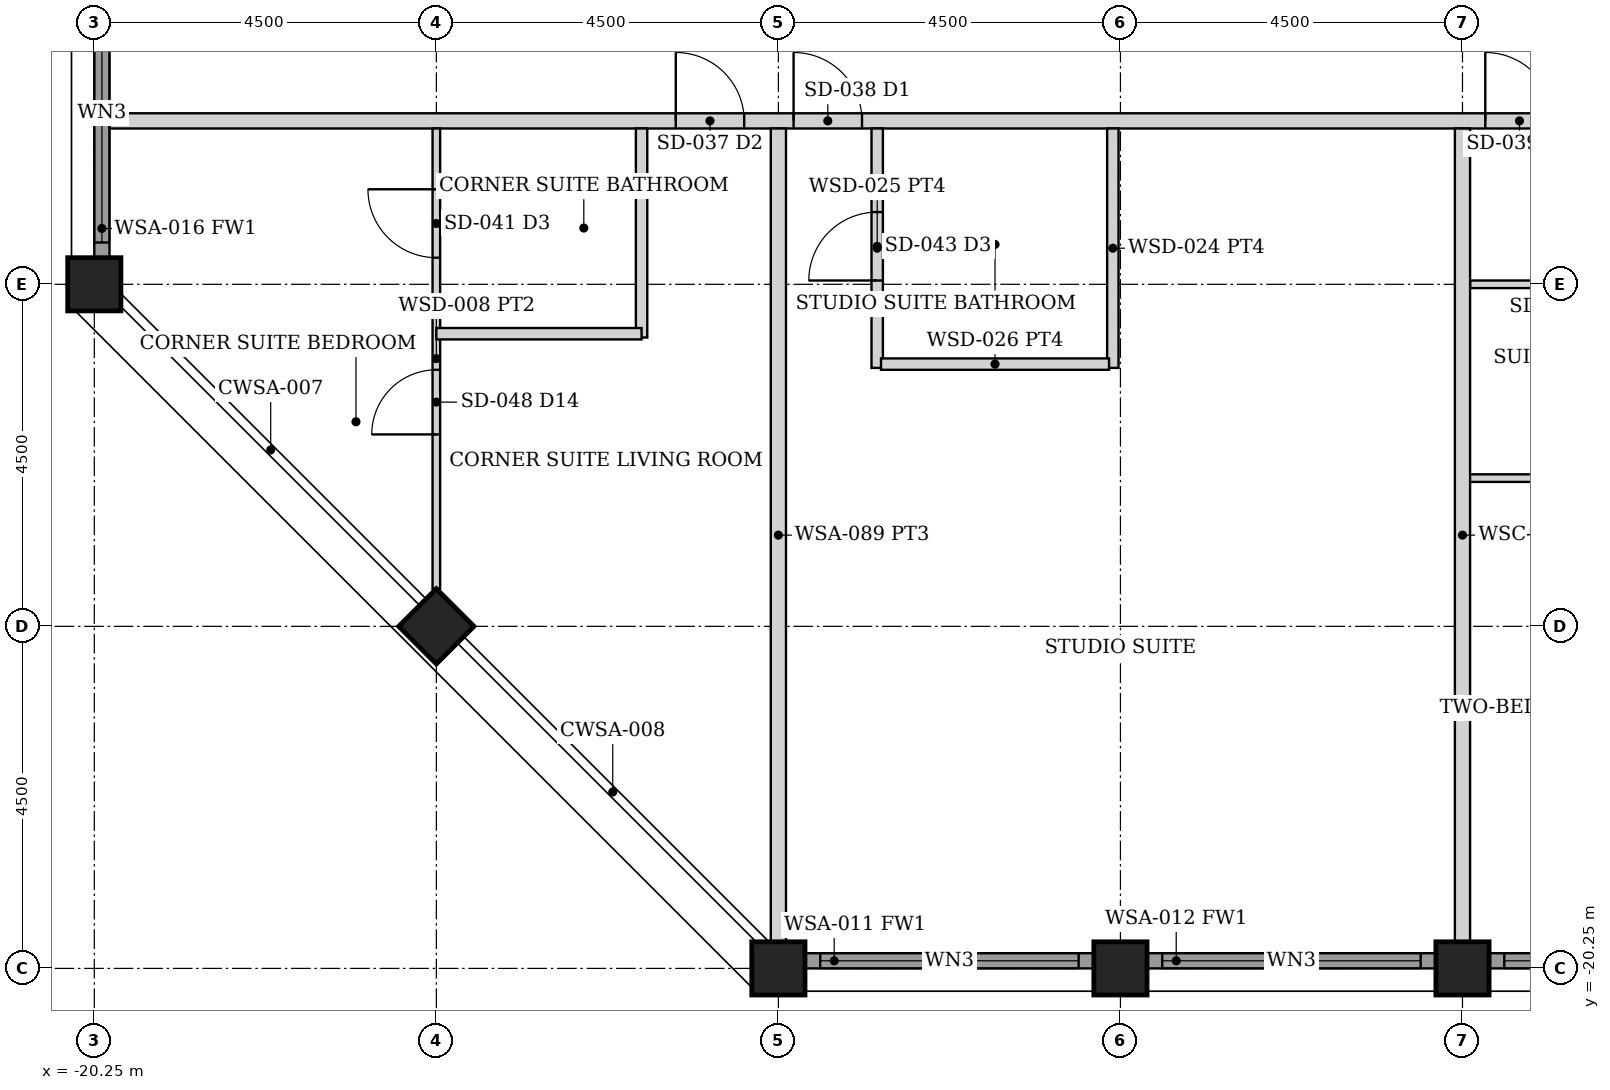
"""IFC4 building model, lengths in metres.
Left out: names, types, materials, properties, quantities, classifications, styles, units other than length and angle.
Written with IfcOpenShell. Run it as: python <this file> out.ifc"""

import sys

from ifc_helpers import new_model, si_unit, direction, frame, frame_2d, origin, origin_2d, place, context, subcontext, project, spatial, rectangle, hollow_rectangle, extrude, element, fill, save


model = new_model("IFC4")
c1 = context("Model", 3, precision=1e-05, world=origin(), true_north=direction((0.0, 1.0)))
c2 = subcontext(c1, "Body", "Model", "MODEL_VIEW")
j1 = project(units=[si_unit("LENGTHUNIT", "METRE"), si_unit("PLANEANGLEUNIT", "RADIAN")], contexts=[c1])
p1 = place(None, origin())
s1 = spatial("IfcSite", under=j1, at=p1, CompositionType="ELEMENT")
p2 = place(p1, origin())
s2 = spatial("IfcBuilding", under=s1, at=p2, CompositionType="ELEMENT")
p3 = place(p2, frame((0.0, 0.0, 234.55)))
s3 = spatial("IfcBuildingStorey", under=s2, at=p3, CompositionType="ELEMENT", Elevation=234.55)
for number, where, z_axis, x_axis in (
    (1, (-11.25, -20.25, 0.0), (0.0, 0.0, 1.0), (0.0, 1.0, 0.0)),
    (2, (-20.25, -11.25, 0.0), (0.0, 0.0, 1.0), (1.0, 0.0, 0.0)),
    (3, (-6.75, -20.25, 0.0), (0.0, 0.0, 1.0), (0.0, 1.0, 0.0)),
    (4, (-2.25, -20.25, 0.0), (0.0, 0.0, 1.0), (0.0, 1.0, 0.0)),
    (5, (-15.75, -15.75, 0.0), (0.0, 0.0, 1.0), (0.707, 0.707, 0.0)),
):
    element("IfcColumn", number, at=place(p3, frame(where, z_axis=z_axis, x_axis=x_axis)), inside=s3, PredefinedType="COLUMN", context=c2, shape_type="SweptSolid", body=[
        extrude(hollow_rectangle(XDim=0.7, YDim=0.7, WallThickness=0.04, at=origin_2d()), origin(), (0.0, 0.0, 1.0), 3.75),
    ])
p4 = place(p3, frame((-10.895, -20.15, 0.0), z_axis=(0.0, 0.0, 1.0), x_axis=(1.0, 0.0, 0.0)))
e6 = element("IfcWall", 6, at=p4, inside=s3, PredefinedType="SOLIDWALL", context=c2, shape_type="SweptSolid", body=[
    extrude(rectangle(XDim=3.79, YDim=0.2, at=frame_2d((1.895, 0.0))), origin(), (0.0, 0.0, 1.0), 2.629),
])
p5 = place(p4, frame((0.195, 0.0, 0.3)))
e7 = element("IfcOpeningElement", 7, at=p5, cuts=e6, PredefinedType="OPENING", context=c2, shape_type="SweptSolid", body=[
    extrude(rectangle(XDim=3.4, YDim=2.179, at=frame_2d((1.7, 1.089))), frame((0.0, 0.11, 0.0), z_axis=(0.0, -1.0, 0.0), x_axis=(1.0, 0.0, 0.0)), (0.0, 0.0, 1.0), 0.22),
])
p6 = place(p3, frame((-6.395, -20.15, 0.0), z_axis=(0.0, 0.0, 1.0), x_axis=(1.0, 0.0, 0.0)))
e8 = element("IfcWall", 8, at=p6, inside=s3, PredefinedType="SOLIDWALL", context=c2, shape_type="SweptSolid", body=[
    extrude(rectangle(XDim=3.79, YDim=0.2, at=frame_2d((1.895, 0.0))), origin(), (0.0, 0.0, 1.0), 2.629),
])
p7 = place(p6, frame((0.195, 0.0, 0.3)))
e9 = element("IfcOpeningElement", 9, at=p7, cuts=e8, PredefinedType="OPENING", context=c2, shape_type="SweptSolid", body=[
    extrude(rectangle(XDim=3.4, YDim=2.179, at=frame_2d((1.7, 1.089))), frame((0.0, 0.11, 0.0), z_axis=(0.0, -1.0, 0.0), x_axis=(1.0, 0.0, 0.0)), (0.0, 0.0, 1.0), 0.22),
])
p8 = place(p3, frame((-1.895, -20.15, 0.0), z_axis=(0.0, 0.0, 1.0), x_axis=(1.0, 0.0, 0.0)))
e10 = element("IfcWall", 10, at=p8, inside=s3, PredefinedType="SOLIDWALL", context=c2, shape_type="SweptSolid", body=[
    extrude(rectangle(XDim=3.79, YDim=0.2, at=frame_2d((1.895, 0.0))), origin(), (0.0, 0.0, 1.0), 2.629),
])
p9 = place(p8, frame((0.195, 0.0, 0.3)))
e11 = element("IfcOpeningElement", 11, at=p9, cuts=e10, PredefinedType="OPENING", context=c2, shape_type="SweptSolid", body=[
    extrude(rectangle(XDim=3.4, YDim=2.179, at=frame_2d((1.7, 1.089))), frame((0.0, 0.11, 0.0), z_axis=(0.0, -1.0, 0.0), x_axis=(1.0, 0.0, 0.0)), (0.0, 0.0, 1.0), 0.22),
])
p10 = place(p3, frame((-20.15, -10.895, 0.0), z_axis=(0.0, 0.0, 1.0), x_axis=(0.0, 1.0, 0.0)))
e12 = element("IfcWall", 12, at=p10, inside=s3, PredefinedType="SOLIDWALL", context=c2, shape_type="SweptSolid", body=[
    extrude(rectangle(XDim=3.79, YDim=0.2, at=frame_2d((1.895, 0.0))), origin(), (0.0, 0.0, 1.0), 2.629),
])
p11 = place(p10, frame((0.195, 0.0, 0.3)))
e13 = element("IfcOpeningElement", 13, at=p11, cuts=e12, PredefinedType="OPENING", context=c2, shape_type="SweptSolid", body=[
    extrude(rectangle(XDim=3.4, YDim=2.179, at=frame_2d((1.7, 1.089))), frame((0.0, 0.11, 0.0), z_axis=(0.0, -1.0, 0.0), x_axis=(1.0, 0.0, 0.0)), (0.0, 0.0, 1.0), 0.22),
])
p12 = place(p3, frame((-20.05, -9.1, 0.0), z_axis=(0.0, 0.0, 1.0), x_axis=(1.0, 0.0, 0.0)))
e14 = element("IfcWall", 14, at=p12, inside=s3, PredefinedType="PARTITIONING", context=c2, shape_type="SweptSolid", body=[
    extrude(rectangle(XDim=40.1, YDim=0.2, at=frame_2d((20.05, 0.0))), origin(), (0.0, 0.0, 1.0), 2.629),
])
p13 = place(p12, frame((9.0, 0.0, 0.0)))
e15 = element("IfcOpeningElement", 15, at=p13, cuts=e14, PredefinedType="OPENING", context=c2, shape_type="SweptSolid", body=[
    extrude(rectangle(XDim=0.9, YDim=2.1, at=frame_2d((0.45, 1.05))), frame((0.0, 0.11, 0.0), z_axis=(0.0, -1.0, 0.0), x_axis=(1.0, 0.0, 0.0)), (0.0, 0.0, 1.0), 0.22),
])
p14 = place(p12, frame((18.1, 0.0, 0.0)))
e16 = element("IfcOpeningElement", 16, at=p14, cuts=e14, PredefinedType="OPENING", context=c2, shape_type="SweptSolid", body=[
    extrude(rectangle(XDim=0.9, YDim=2.1, at=frame_2d((0.45, 1.05))), frame((0.0, 0.11, 0.0), z_axis=(0.0, -1.0, 0.0), x_axis=(1.0, 0.0, 0.0)), (0.0, 0.0, 1.0), 0.22),
])
p15 = place(p12, frame((31.75, 0.0, 0.0)))
e17 = element("IfcOpeningElement", 17, at=p15, cuts=e14, PredefinedType="OPENING", context=c2, shape_type="SweptSolid", body=[
    extrude(rectangle(XDim=0.9, YDim=2.1, at=frame_2d((0.45, 1.05))), frame((0.0, 0.11, 0.0), z_axis=(0.0, -1.0, 0.0), x_axis=(1.0, 0.0, 0.0)), (0.0, 0.0, 1.0), 0.22),
])
p16 = place(p12, frame((7.45, 0.0, 0.0)))
e18 = element("IfcOpeningElement", 18, at=p16, cuts=e14, PredefinedType="OPENING", context=c2, shape_type="SweptSolid", body=[
    extrude(rectangle(XDim=0.9, YDim=2.1, at=frame_2d((0.45, 1.05))), frame((0.0, 0.11, 0.0), z_axis=(0.0, -1.0, 0.0), x_axis=(1.0, 0.0, 0.0)), (0.0, 0.0, 1.0), 0.22),
])
p17 = place(p3, frame((-9.95, -12.35, 0.0), z_axis=(0.0, 0.0, 1.0), x_axis=(0.0, 1.0, 0.0)))
e19 = element("IfcWall", 19, at=p17, inside=s3, PredefinedType="PARTITIONING", context=c2, shape_type="SweptSolid", body=[
    extrude(rectangle(XDim=3.15, YDim=0.15, at=frame_2d((1.575, 0.0))), origin(), (0.0, 0.0, 1.0), 2.629),
])
p18 = place(p17, frame((1.15, 0.0, 0.0)))
e20 = element("IfcOpeningElement", 20, at=p18, cuts=e19, PredefinedType="OPENING", context=c2, shape_type="SweptSolid", body=[
    extrude(rectangle(XDim=0.9, YDim=2.1, at=frame_2d((0.45, 1.05))), frame((0.0, 0.085, 0.0), z_axis=(0.0, -1.0, 0.0), x_axis=(1.0, 0.0, 0.0)), (0.0, 0.0, 1.0), 0.17),
])
p19 = place(p3, frame((-6.85, -12.35, 0.0), z_axis=(0.0, 0.0, 1.0), x_axis=(0.0, 1.0, 0.0)))
e21 = element("IfcWall", 21, at=p19, inside=s3, PredefinedType="PARTITIONING", context=c2, shape_type="SweptSolid", body=[
    extrude(rectangle(XDim=3.15, YDim=0.15, at=frame_2d((1.575, 0.0))), origin(), (0.0, 0.0, 1.0), 2.629),
])
p20 = place(p3, frame((-9.9, -12.3, 0.0), z_axis=(0.0, 0.0, 1.0), x_axis=(1.0, 0.0, 0.0)))
e22 = element("IfcWall", 22, at=p20, inside=s3, PredefinedType="PARTITIONING", context=c2, shape_type="SweptSolid", body=[
    extrude(rectangle(XDim=3.0, YDim=0.15, at=frame_2d((1.5, 0.0))), origin(), (0.0, 0.0, 1.0), 2.629),
])
p21 = place(p3, frame((-2.15, -11.25, 0.0), z_axis=(0.0, 0.0, 1.0), x_axis=(1.0, 0.0, 0.0)))
e23 = element("IfcWall", 23, at=p21, inside=s3, PredefinedType="PARTITIONING", context=c2, shape_type="SweptSolid", body=[
    extrude(rectangle(XDim=13.3, YDim=0.1, at=frame_2d((6.65, 0.0))), origin(), (0.0, 0.0, 1.0), 2.629),
])
p22 = place(p21, frame((0.85, 0.0, 0.0)))
e24 = element("IfcOpeningElement", 24, at=p22, cuts=e23, PredefinedType="OPENING", context=c2, shape_type="SweptSolid", body=[
    extrude(rectangle(XDim=0.9, YDim=2.1, at=frame_2d((0.45, 1.05))), frame((0.0, 0.06, 0.0), z_axis=(0.0, -1.0, 0.0), x_axis=(1.0, 0.0, 0.0)), (0.0, 0.0, 1.0), 0.12),
])
p23 = place(p21, frame((3.1, 0.0, 0.0)))
e25 = element("IfcOpeningElement", 25, at=p23, cuts=e23, PredefinedType="OPENING", context=c2, shape_type="SweptSolid", body=[
    extrude(rectangle(XDim=0.9, YDim=2.1, at=frame_2d((0.45, 1.05))), frame((0.0, 0.06, 0.0), z_axis=(0.0, -1.0, 0.0), x_axis=(1.0, 0.0, 0.0)), (0.0, 0.0, 1.0), 0.12),
])
p24 = place(p21, frame((4.625, 0.0, 0.0)))
e26 = element("IfcOpeningElement", 26, at=p24, cuts=e23, PredefinedType="OPENING", context=c2, shape_type="SweptSolid", body=[
    extrude(rectangle(XDim=0.85, YDim=2.1, at=frame_2d((0.425, 1.05))), frame((0.0, 0.06, 0.0), z_axis=(0.0, -1.0, 0.0), x_axis=(1.0, 0.0, 0.0)), (0.0, 0.0, 1.0), 0.12),
])
p25 = place(p21, frame((9.125, 0.0, 0.0)))
e27 = element("IfcOpeningElement", 27, at=p25, cuts=e23, PredefinedType="OPENING", context=c2, shape_type="SweptSolid", body=[
    extrude(rectangle(XDim=0.85, YDim=2.1, at=frame_2d((0.425, 1.05))), frame((0.0, 0.06, 0.0), z_axis=(0.0, -1.0, 0.0), x_axis=(1.0, 0.0, 0.0)), (0.0, 0.0, 1.0), 0.12),
])
p26 = place(p3, frame((-2.19, -13.8, 0.0), z_axis=(0.0, 0.0, 1.0), x_axis=(1.0, 0.0, 0.0)))
e28 = element("IfcWall", 28, at=p26, inside=s3, PredefinedType="PARTITIONING", context=c2, shape_type="SweptSolid", body=[
    extrude(rectangle(XDim=2.74, YDim=0.1, at=frame_2d((1.37, 0.0))), origin(), (0.0, 0.0, 1.0), 2.629),
])
for number, where, z_axis, x_axis in (
    (29, (-11.25, -19.9, 0.0), (0.0, 0.0, 1.0), (0.0, 1.0, 0.0)),
    (30, (-2.25, -19.9, 0.0), (0.0, 0.0, 1.0), (0.0, 1.0, 0.0)),
):
    element("IfcWall", number, at=place(p3, frame(where, z_axis=z_axis, x_axis=x_axis)), inside=s3, PredefinedType="PARTITIONING", context=c2, shape_type="SweptSolid", body=[
        extrude(rectangle(XDim=10.7, YDim=0.2, at=frame_2d((5.35, 0.0))), origin(), (0.0, 0.0, 1.0), 2.629),
    ])
p27 = place(p3, frame((-15.75, -15.255, 0.0), z_axis=(0.0, 0.0, 1.0), x_axis=(0.0, 1.0, 0.0)))
e31 = element("IfcWall", 31, at=p27, inside=s3, PredefinedType="PARTITIONING", context=c2, shape_type="SweptSolid", body=[
    extrude(rectangle(XDim=6.055, YDim=0.1, at=frame_2d((3.027, 0.0))), origin(), (0.0, 0.0, 1.0), 2.629),
])
p28 = place(p27, frame((2.03, 0.0, 0.0)))
e32 = element("IfcOpeningElement", 32, at=p28, cuts=e31, PredefinedType="OPENING", context=c2, shape_type="SweptSolid", body=[
    extrude(rectangle(XDim=0.85, YDim=2.1, at=frame_2d((0.425, 1.05))), frame((0.0, 0.06, 0.0), z_axis=(0.0, -1.0, 0.0), x_axis=(1.0, 0.0, 0.0)), (0.0, 0.0, 1.0), 0.12),
])
p29 = place(p27, frame((4.355, 0.0, 0.0)))
e33 = element("IfcOpeningElement", 33, at=p29, cuts=e31, PredefinedType="OPENING", context=c2, shape_type="SweptSolid", body=[
    extrude(rectangle(XDim=0.9, YDim=2.1, at=frame_2d((0.45, 1.05))), frame((0.0, 0.06, 0.0), z_axis=(0.0, -1.0, 0.0), x_axis=(1.0, 0.0, 0.0)), (0.0, 0.0, 1.0), 0.12),
])
p30 = place(p3, frame((-13.05, -11.95, 0.0), z_axis=(0.0, 0.0, 1.0), x_axis=(0.0, 1.0, 0.0)))
e34 = element("IfcWall", 34, at=p30, inside=s3, PredefinedType="PARTITIONING", context=c2, shape_type="SweptSolid", body=[
    extrude(rectangle(XDim=2.75, YDim=0.15, at=frame_2d((1.375, 0.0))), origin(), (0.0, 0.0, 1.0), 2.629),
])
p31 = place(p3, frame((-15.75, -11.9, 0.0), z_axis=(0.0, 0.0, 1.0), x_axis=(1.0, 0.0, 0.0)))
e35 = element("IfcWall", 35, at=p31, inside=s3, PredefinedType="PARTITIONING", context=c2, shape_type="SweptSolid", body=[
    extrude(rectangle(XDim=2.7, YDim=0.15, at=frame_2d((1.35, 0.0))), origin(), (0.0, 0.0, 1.0), 2.629),
])
p32 = place(p5, origin())
e36 = element("IfcWindow", 36, at=p32, inside=s3, PartitioningType="SINGLE_PANEL", PredefinedType="WINDOW", context=c2, shape_type="SweptSolid", body=[
    extrude(rectangle(XDim=3.4, YDim=2.179, at=frame_2d((1.7, 1.089))), frame((0.0, 0.03, 0.0), z_axis=(0.0, -1.0, 0.0), x_axis=(1.0, 0.0, 0.0)), (0.0, 0.0, 1.0), 0.06),
])
fill(e7, e36)
p33 = place(p7, origin())
e37 = element("IfcWindow", 37, at=p33, inside=s3, PartitioningType="SINGLE_PANEL", PredefinedType="WINDOW", context=c2, shape_type="SweptSolid", body=[
    extrude(rectangle(XDim=3.4, YDim=2.179, at=frame_2d((1.7, 1.089))), frame((0.0, 0.03, 0.0), z_axis=(0.0, -1.0, 0.0), x_axis=(1.0, 0.0, 0.0)), (0.0, 0.0, 1.0), 0.06),
])
fill(e9, e37)
p34 = place(p9, origin())
e38 = element("IfcWindow", 38, at=p34, inside=s3, PartitioningType="SINGLE_PANEL", PredefinedType="WINDOW", context=c2, shape_type="SweptSolid", body=[
    extrude(rectangle(XDim=3.4, YDim=2.179, at=frame_2d((1.7, 1.089))), frame((0.0, 0.03, 0.0), z_axis=(0.0, -1.0, 0.0), x_axis=(1.0, 0.0, 0.0)), (0.0, 0.0, 1.0), 0.06),
])
fill(e11, e38)
p35 = place(p11, origin())
e39 = element("IfcWindow", 39, at=p35, inside=s3, PartitioningType="SINGLE_PANEL", PredefinedType="WINDOW", context=c2, shape_type="SweptSolid", body=[
    extrude(rectangle(XDim=3.4, YDim=2.179, at=frame_2d((1.7, 1.089))), frame((0.0, 0.03, 0.0), z_axis=(0.0, -1.0, 0.0), x_axis=(1.0, 0.0, 0.0)), (0.0, 0.0, 1.0), 0.06),
])
fill(e13, e39)
p36 = place(p13, origin())
e40 = element("IfcDoor", 40, at=p36, inside=s3, OperationType="SINGLE_SWING_LEFT", PredefinedType="DOOR", context=c2, shape_type="SweptSolid", body=[
    extrude(rectangle(XDim=0.9, YDim=2.1, at=frame_2d((0.45, 1.05))), frame((0.0, 0.025, 0.0), z_axis=(0.0, -1.0, 0.0), x_axis=(1.0, 0.0, 0.0)), (0.0, 0.0, 1.0), 0.05),
])
fill(e15, e40)
p37 = place(p18, origin())
e41 = element("IfcDoor", 41, at=p37, inside=s3, OperationType="SINGLE_SWING_LEFT", PredefinedType="DOOR", context=c2, shape_type="SweptSolid", body=[
    extrude(rectangle(XDim=0.9, YDim=2.1, at=frame_2d((0.45, 1.05))), frame((0.0, 0.025, 0.0), z_axis=(0.0, -1.0, 0.0), x_axis=(1.0, 0.0, 0.0)), (0.0, 0.0, 1.0), 0.05),
])
fill(e20, e41)
p38 = place(p14, origin())
e42 = element("IfcDoor", 42, at=p38, inside=s3, OperationType="SINGLE_SWING_LEFT", PredefinedType="DOOR", context=c2, shape_type="SweptSolid", body=[
    extrude(rectangle(XDim=0.9, YDim=2.1, at=frame_2d((0.45, 1.05))), frame((0.0, 0.025, 0.0), z_axis=(0.0, -1.0, 0.0), x_axis=(1.0, 0.0, 0.0)), (0.0, 0.0, 1.0), 0.05),
])
fill(e16, e42)
p39 = place(p16, origin())
e43 = element("IfcDoor", 43, at=p39, inside=s3, OperationType="SINGLE_SWING_LEFT", PredefinedType="DOOR", context=c2, shape_type="SweptSolid", body=[
    extrude(rectangle(XDim=0.9, YDim=2.1, at=frame_2d((0.45, 1.05))), frame((0.0, 0.025, 0.0), z_axis=(0.0, -1.0, 0.0), x_axis=(1.0, 0.0, 0.0)), (0.0, 0.0, 1.0), 0.05),
])
fill(e18, e43)
p40 = place(p28, origin())
e44 = element("IfcDoor", 44, at=p40, inside=s3, OperationType="SINGLE_SWING_LEFT", PredefinedType="DOOR", context=c2, shape_type="SweptSolid", body=[
    extrude(rectangle(XDim=0.85, YDim=2.1, at=frame_2d((0.425, 1.05))), frame((0.0, 0.025, 0.0), z_axis=(0.0, -1.0, 0.0), x_axis=(1.0, 0.0, 0.0)), (0.0, 0.0, 1.0), 0.05),
])
fill(e32, e44)
p41 = place(p29, origin())
e45 = element("IfcDoor", 45, at=p41, inside=s3, OperationType="SINGLE_SWING_RIGHT", PredefinedType="DOOR", context=c2, shape_type="SweptSolid", body=[
    extrude(rectangle(XDim=0.9, YDim=2.1, at=frame_2d((0.45, 1.05))), frame((0.0, 0.025, 0.0), z_axis=(0.0, -1.0, 0.0), x_axis=(1.0, 0.0, 0.0)), (0.0, 0.0, 1.0), 0.05),
])
fill(e33, e45)
save(model, sys.argv[1])
